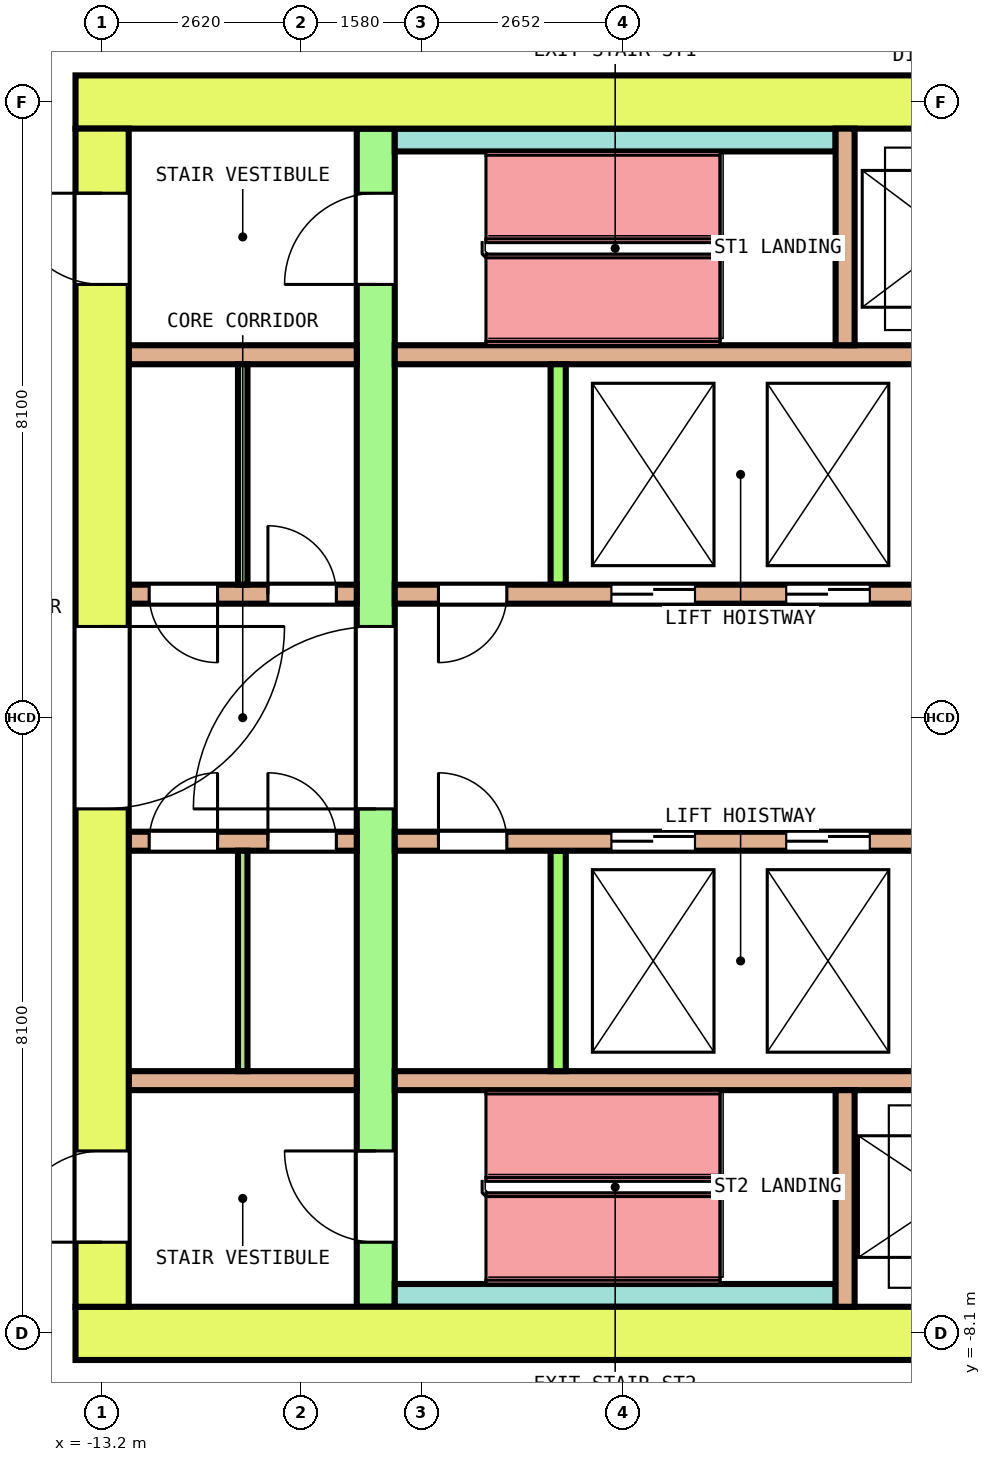
"""IFC4 building model, lengths in metres.
Left out: names, types, materials, properties, quantities, classifications, styles, units other than length and angle.
Written with IfcOpenShell. Run it as: python <this file> out.ifc"""

import sys

from ifc_helpers import new_model, si_unit, direction, frame, frame_2d, origin, place, context, subcontext, project, spatial, rectangle, extrude, element, fill, save


model = new_model("IFC4")
c1 = context("Model", 3, precision=1e-05, world=origin(), true_north=direction((0.0, 1.0)))
c2 = subcontext(c1, "Body", "Model", "MODEL_VIEW")
j1 = project(units=[si_unit("LENGTHUNIT", "METRE"), si_unit("PLANEANGLEUNIT", "RADIAN")], contexts=[c1])
p1 = place(None, origin())
s1 = spatial("IfcSite", under=j1, at=p1, CompositionType="ELEMENT")
p2 = place(p1, origin())
s2 = spatial("IfcBuilding", under=s1, at=p2, CompositionType="ELEMENT")
p3 = place(p2, frame((0.0, 0.0, 184.8)))
s3 = spatial("IfcBuildingStorey", under=s2, at=p3, CompositionType="ELEMENT", Elevation=184.8)
p4 = place(p3, frame((-13.55, 8.1, 0.0), z_axis=(0.0, 0.0, 1.0), x_axis=(1.0, 0.0, 0.0)))
e1 = element("IfcWall", 1, at=p4, inside=s3, PredefinedType="SHEAR", context=c2, shape_type="SweptSolid", body=[
    extrude(rectangle(XDim=27.1, YDim=0.7, at=frame_2d((13.55, 0.0))), origin(), (0.0, 0.0, 1.0), 4.1),
])
p5 = place(p4, frame((14.475, 0.0, 0.0)))
e2 = element("IfcOpeningElement", 2, at=p5, cuts=e1, PredefinedType="OPENING", context=c2, shape_type="SweptSolid", body=[
    extrude(rectangle(XDim=1.4, YDim=2.1, at=frame_2d((0.7, 1.05))), frame((0.0, 0.36, 0.0), z_axis=(0.0, -1.0, 0.0), x_axis=(1.0, 0.0, 0.0)), (0.0, 0.0, 1.0), 0.72),
])
p6 = place(p3, frame((-13.55, -8.1, 0.0), z_axis=(0.0, 0.0, 1.0), x_axis=(1.0, 0.0, 0.0)))
e3 = element("IfcWall", 3, at=p6, inside=s3, PredefinedType="SHEAR", context=c2, shape_type="SweptSolid", body=[
    extrude(rectangle(XDim=27.1, YDim=0.7, at=frame_2d((13.55, 0.0))), origin(), (0.0, 0.0, 1.0), 4.1),
])
p7 = place(p6, frame((15.1, 0.0, 0.0)))
e4 = element("IfcOpeningElement", 4, at=p7, cuts=e3, PredefinedType="OPENING", context=c2, shape_type="SweptSolid", body=[
    extrude(rectangle(XDim=1.2, YDim=2.1, at=frame_2d((0.6, 1.05))), frame((0.0, 0.36, 0.0), z_axis=(0.0, -1.0, 0.0), x_axis=(1.0, 0.0, 0.0)), (0.0, 0.0, 1.0), 0.72),
])
p8 = place(p3, frame((-13.2, -7.75, 0.0), z_axis=(0.0, 0.0, 1.0), x_axis=(0.0, 1.0, 0.0)))
e5 = element("IfcWall", 5, at=p8, inside=s3, PredefinedType="SHEAR", context=c2, shape_type="SweptSolid", body=[
    extrude(rectangle(XDim=15.5, YDim=0.7, at=frame_2d((7.75, 0.0))), origin(), (0.0, 0.0, 1.0), 4.1),
])
p9 = place(p8, frame((6.55, 0.0, 0.0)))
e6 = element("IfcOpeningElement", 6, at=p9, cuts=e5, PredefinedType="OPENING", context=c2, shape_type="SweptSolid", body=[
    extrude(rectangle(XDim=2.4, YDim=2.1, at=frame_2d((1.2, 1.05))), frame((0.0, 0.36, 0.0), z_axis=(0.0, -1.0, 0.0), x_axis=(1.0, 0.0, 0.0)), (0.0, 0.0, 1.0), 0.72),
])
p10 = place(p8, frame((13.45, 0.0, 0.0)))
e7 = element("IfcOpeningElement", 7, at=p10, cuts=e5, PredefinedType="OPENING", context=c2, shape_type="SweptSolid", body=[
    extrude(rectangle(XDim=1.2, YDim=2.1, at=frame_2d((0.6, 1.05))), frame((0.0, 0.36, 0.0), z_axis=(0.0, -1.0, 0.0), x_axis=(1.0, 0.0, 0.0)), (0.0, 0.0, 1.0), 0.72),
])
p11 = place(p8, frame((0.85, 0.0, 0.0)))
e8 = element("IfcOpeningElement", 8, at=p11, cuts=e5, PredefinedType="OPENING", context=c2, shape_type="SweptSolid", body=[
    extrude(rectangle(XDim=1.2, YDim=2.1, at=frame_2d((0.6, 1.05))), frame((0.0, 0.36, 0.0), z_axis=(0.0, -1.0, 0.0), x_axis=(1.0, 0.0, 0.0)), (0.0, 0.0, 1.0), 0.72),
])
p12 = place(p3, frame((-9.6, -7.75, 0.0), z_axis=(0.0, 0.0, 1.0), x_axis=(0.0, 1.0, 0.0)))
e9 = element("IfcWall", 9, at=p12, inside=s3, PredefinedType="SHEAR", context=c2, shape_type="SweptSolid", body=[
    extrude(rectangle(XDim=15.5, YDim=0.5, at=frame_2d((7.75, 0.0))), origin(), (0.0, 0.0, 1.0), 4.1),
])
p13 = place(p12, frame((6.55, 0.0, 0.0)))
e10 = element("IfcOpeningElement", 10, at=p13, cuts=e9, PredefinedType="OPENING", context=c2, shape_type="SweptSolid", body=[
    extrude(rectangle(XDim=2.4, YDim=2.1, at=frame_2d((1.2, 1.05))), frame((0.0, 0.26, 0.0), z_axis=(0.0, -1.0, 0.0), x_axis=(1.0, 0.0, 0.0)), (0.0, 0.0, 1.0), 0.52),
])
p14 = place(p12, frame((13.45, 0.0, 0.0)))
e11 = element("IfcOpeningElement", 11, at=p14, cuts=e9, PredefinedType="OPENING", context=c2, shape_type="SweptSolid", body=[
    extrude(rectangle(XDim=1.2, YDim=2.1, at=frame_2d((0.6, 1.05))), frame((0.0, 0.26, 0.0), z_axis=(0.0, -1.0, 0.0), x_axis=(1.0, 0.0, 0.0)), (0.0, 0.0, 1.0), 0.52),
])
p15 = place(p12, frame((0.85, 0.0, 0.0)))
e12 = element("IfcOpeningElement", 12, at=p15, cuts=e9, PredefinedType="OPENING", context=c2, shape_type="SweptSolid", body=[
    extrude(rectangle(XDim=1.2, YDim=2.1, at=frame_2d((0.6, 1.05))), frame((0.0, 0.26, 0.0), z_axis=(0.0, -1.0, 0.0), x_axis=(1.0, 0.0, 0.0)), (0.0, 0.0, 1.0), 0.52),
])
p16 = place(p3, frame((-12.85, 1.625, 0.0), z_axis=(0.0, 0.0, 1.0), x_axis=(1.0, 0.0, 0.0)))
e13 = element("IfcWall", 13, at=p16, inside=s3, PredefinedType="SOLIDWALL", context=c2, shape_type="SweptSolid", body=[
    extrude(rectangle(XDim=3.0, YDim=0.25, at=frame_2d((1.5, 0.0))), origin(), (0.0, 0.0, 1.0), 4.1),
])
p17 = place(p16, frame((0.269, 0.0, 0.0)))
e14 = element("IfcOpeningElement", 14, at=p17, cuts=e13, PredefinedType="OPENING", context=c2, shape_type="SweptSolid", body=[
    extrude(rectangle(XDim=0.9, YDim=2.1, at=frame_2d((0.45, 1.05))), frame((0.0, 0.135, 0.0), z_axis=(0.0, -1.0, 0.0), x_axis=(1.0, 0.0, 0.0)), (0.0, 0.0, 1.0), 0.27),
])
p18 = place(p16, frame((1.831, 0.0, 0.0)))
e15 = element("IfcOpeningElement", 15, at=p18, cuts=e13, PredefinedType="OPENING", context=c2, shape_type="SweptSolid", body=[
    extrude(rectangle(XDim=0.9, YDim=2.1, at=frame_2d((0.45, 1.05))), frame((0.0, 0.135, 0.0), z_axis=(0.0, -1.0, 0.0), x_axis=(1.0, 0.0, 0.0)), (0.0, 0.0, 1.0), 0.27),
])
p19 = place(p3, frame((-9.35, 1.625, 0.0), z_axis=(0.0, 0.0, 1.0), x_axis=(1.0, 0.0, 0.0)))
e16 = element("IfcWall", 16, at=p19, inside=s3, PredefinedType="SOLIDWALL", context=c2, shape_type="SweptSolid", body=[
    extrude(rectangle(XDim=18.7, YDim=0.25, at=frame_2d((9.35, 0.0))), origin(), (0.0, 0.0, 1.0), 4.1),
])
p20 = place(p19, frame((2.85, 0.0, 0.0)))
e17 = element("IfcOpeningElement", 17, at=p20, cuts=e16, PredefinedType="OPENING", context=c2, shape_type="SweptSolid", body=[
    extrude(rectangle(XDim=1.1, YDim=2.1, at=frame_2d((0.55, 1.05))), frame((0.0, 0.135, 0.0), z_axis=(0.0, -1.0, 0.0), x_axis=(1.0, 0.0, 0.0)), (0.0, 0.0, 1.0), 0.27),
])
p21 = place(p19, frame((5.15, 0.0, 0.0)))
e18 = element("IfcOpeningElement", 18, at=p21, cuts=e16, PredefinedType="OPENING", context=c2, shape_type="SweptSolid", body=[
    extrude(rectangle(XDim=1.1, YDim=2.1, at=frame_2d((0.55, 1.05))), frame((0.0, 0.135, 0.0), z_axis=(0.0, -1.0, 0.0), x_axis=(1.0, 0.0, 0.0)), (0.0, 0.0, 1.0), 0.27),
])
p22 = place(p19, frame((14.8, 0.0, 0.0)))
e19 = element("IfcOpeningElement", 19, at=p22, cuts=e16, PredefinedType="OPENING", context=c2, shape_type="SweptSolid", body=[
    extrude(rectangle(XDim=1.1, YDim=2.1, at=frame_2d((0.55, 1.05))), frame((0.0, 0.135, 0.0), z_axis=(0.0, -1.0, 0.0), x_axis=(1.0, 0.0, 0.0)), (0.0, 0.0, 1.0), 0.27),
])
p23 = place(p19, frame((0.575, 0.0, 0.0)))
e20 = element("IfcOpeningElement", 20, at=p23, cuts=e16, PredefinedType="OPENING", context=c2, shape_type="SweptSolid", body=[
    extrude(rectangle(XDim=0.9, YDim=2.1, at=frame_2d((0.45, 1.05))), frame((0.0, 0.135, 0.0), z_axis=(0.0, -1.0, 0.0), x_axis=(1.0, 0.0, 0.0)), (0.0, 0.0, 1.0), 0.27),
])
p24 = place(p19, frame((17.225, 0.0, 0.0)))
e21 = element("IfcOpeningElement", 21, at=p24, cuts=e16, PredefinedType="OPENING", context=c2, shape_type="SweptSolid", body=[
    extrude(rectangle(XDim=0.9, YDim=2.1, at=frame_2d((0.45, 1.05))), frame((0.0, 0.135, 0.0), z_axis=(0.0, -1.0, 0.0), x_axis=(1.0, 0.0, 0.0)), (0.0, 0.0, 1.0), 0.27),
])
p25 = place(p3, frame((-12.85, 4.775, 0.0), z_axis=(0.0, 0.0, 1.0), x_axis=(1.0, 0.0, 0.0)))
e22 = element("IfcWall", 22, at=p25, inside=s3, PredefinedType="SOLIDWALL", context=c2, shape_type="SweptSolid", body=[
    extrude(rectangle(XDim=3.0, YDim=0.25, at=frame_2d((1.5, 0.0))), origin(), (0.0, 0.0, 1.0), 4.1),
])
p26 = place(p3, frame((-9.35, 4.775, 0.0), z_axis=(0.0, 0.0, 1.0), x_axis=(1.0, 0.0, 0.0)))
e23 = element("IfcWall", 23, at=p26, inside=s3, PredefinedType="SOLIDWALL", context=c2, shape_type="SweptSolid", body=[
    extrude(rectangle(XDim=18.7, YDim=0.25, at=frame_2d((9.35, 0.0))), origin(), (0.0, 0.0, 1.0), 4.1),
])
p27 = place(p3, frame((-7.2, 1.75, 0.0), z_axis=(0.0, 0.0, 1.0), x_axis=(0.0, 1.0, 0.0)))
e24 = element("IfcWall", 24, at=p27, inside=s3, PredefinedType="SOLIDWALL", context=c2, shape_type="SweptSolid", body=[
    extrude(rectangle(XDim=2.9, YDim=0.2, at=frame_2d((1.45, 0.0))), origin(), (0.0, 0.0, 1.0), 4.1),
])
p28 = place(p3, frame((-12.85, -1.625, 0.0), z_axis=(0.0, 0.0, 1.0), x_axis=(1.0, 0.0, 0.0)))
e25 = element("IfcWall", 25, at=p28, inside=s3, PredefinedType="SOLIDWALL", context=c2, shape_type="SweptSolid", body=[
    extrude(rectangle(XDim=3.0, YDim=0.25, at=frame_2d((1.5, 0.0))), origin(), (0.0, 0.0, 1.0), 4.1),
])
p29 = place(p28, frame((0.269, 0.0, 0.0)))
e26 = element("IfcOpeningElement", 26, at=p29, cuts=e25, PredefinedType="OPENING", context=c2, shape_type="SweptSolid", body=[
    extrude(rectangle(XDim=0.9, YDim=2.1, at=frame_2d((0.45, 1.05))), frame((0.0, 0.135, 0.0), z_axis=(0.0, -1.0, 0.0), x_axis=(1.0, 0.0, 0.0)), (0.0, 0.0, 1.0), 0.27),
])
p30 = place(p28, frame((1.831, 0.0, 0.0)))
e27 = element("IfcOpeningElement", 27, at=p30, cuts=e25, PredefinedType="OPENING", context=c2, shape_type="SweptSolid", body=[
    extrude(rectangle(XDim=0.9, YDim=2.1, at=frame_2d((0.45, 1.05))), frame((0.0, 0.135, 0.0), z_axis=(0.0, -1.0, 0.0), x_axis=(1.0, 0.0, 0.0)), (0.0, 0.0, 1.0), 0.27),
])
p31 = place(p3, frame((-9.35, -1.625, 0.0), z_axis=(0.0, 0.0, 1.0), x_axis=(1.0, 0.0, 0.0)))
e28 = element("IfcWall", 28, at=p31, inside=s3, PredefinedType="SOLIDWALL", context=c2, shape_type="SweptSolid", body=[
    extrude(rectangle(XDim=18.7, YDim=0.25, at=frame_2d((9.35, 0.0))), origin(), (0.0, 0.0, 1.0), 4.1),
])
p32 = place(p31, frame((2.85, 0.0, 0.0)))
e29 = element("IfcOpeningElement", 29, at=p32, cuts=e28, PredefinedType="OPENING", context=c2, shape_type="SweptSolid", body=[
    extrude(rectangle(XDim=1.1, YDim=2.1, at=frame_2d((0.55, 1.05))), frame((0.0, 0.135, 0.0), z_axis=(0.0, -1.0, 0.0), x_axis=(1.0, 0.0, 0.0)), (0.0, 0.0, 1.0), 0.27),
])
p33 = place(p31, frame((5.15, 0.0, 0.0)))
e30 = element("IfcOpeningElement", 30, at=p33, cuts=e28, PredefinedType="OPENING", context=c2, shape_type="SweptSolid", body=[
    extrude(rectangle(XDim=1.1, YDim=2.1, at=frame_2d((0.55, 1.05))), frame((0.0, 0.135, 0.0), z_axis=(0.0, -1.0, 0.0), x_axis=(1.0, 0.0, 0.0)), (0.0, 0.0, 1.0), 0.27),
])
p34 = place(p31, frame((14.8, 0.0, 0.0)))
e31 = element("IfcOpeningElement", 31, at=p34, cuts=e28, PredefinedType="OPENING", context=c2, shape_type="SweptSolid", body=[
    extrude(rectangle(XDim=1.1, YDim=2.1, at=frame_2d((0.55, 1.05))), frame((0.0, 0.135, 0.0), z_axis=(0.0, -1.0, 0.0), x_axis=(1.0, 0.0, 0.0)), (0.0, 0.0, 1.0), 0.27),
])
p35 = place(p31, frame((0.575, 0.0, 0.0)))
e32 = element("IfcOpeningElement", 32, at=p35, cuts=e28, PredefinedType="OPENING", context=c2, shape_type="SweptSolid", body=[
    extrude(rectangle(XDim=0.9, YDim=2.1, at=frame_2d((0.45, 1.05))), frame((0.0, 0.135, 0.0), z_axis=(0.0, -1.0, 0.0), x_axis=(1.0, 0.0, 0.0)), (0.0, 0.0, 1.0), 0.27),
])
p36 = place(p31, frame((17.225, 0.0, 0.0)))
e33 = element("IfcOpeningElement", 33, at=p36, cuts=e28, PredefinedType="OPENING", context=c2, shape_type="SweptSolid", body=[
    extrude(rectangle(XDim=0.9, YDim=2.1, at=frame_2d((0.45, 1.05))), frame((0.0, 0.135, 0.0), z_axis=(0.0, -1.0, 0.0), x_axis=(1.0, 0.0, 0.0)), (0.0, 0.0, 1.0), 0.27),
])
p37 = place(p3, frame((-12.85, -4.775, 0.0), z_axis=(0.0, 0.0, 1.0), x_axis=(1.0, 0.0, 0.0)))
e34 = element("IfcWall", 34, at=p37, inside=s3, PredefinedType="SOLIDWALL", context=c2, shape_type="SweptSolid", body=[
    extrude(rectangle(XDim=3.0, YDim=0.25, at=frame_2d((1.5, 0.0))), origin(), (0.0, 0.0, 1.0), 4.1),
])
p38 = place(p3, frame((-9.35, -4.775, 0.0), z_axis=(0.0, 0.0, 1.0), x_axis=(1.0, 0.0, 0.0)))
e35 = element("IfcWall", 35, at=p38, inside=s3, PredefinedType="SOLIDWALL", context=c2, shape_type="SweptSolid", body=[
    extrude(rectangle(XDim=18.7, YDim=0.25, at=frame_2d((9.35, 0.0))), origin(), (0.0, 0.0, 1.0), 4.1),
])
p39 = place(p3, frame((-7.2, -4.65, 0.0), z_axis=(0.0, 0.0, 1.0), x_axis=(0.0, 1.0, 0.0)))
e36 = element("IfcWall", 36, at=p39, inside=s3, PredefinedType="SOLIDWALL", context=c2, shape_type="SweptSolid", body=[
    extrude(rectangle(XDim=2.9, YDim=0.2, at=frame_2d((1.45, 0.0))), origin(), (0.0, 0.0, 1.0), 4.1),
])
p40 = place(p3, frame((-9.35, 7.6, 0.0), z_axis=(0.0, 0.0, 1.0), x_axis=(1.0, 0.0, 0.0)))
e37 = element("IfcWall", 37, at=p40, inside=s3, PredefinedType="SOLIDWALL", context=c2, shape_type="SweptSolid", body=[
    extrude(rectangle(XDim=5.8, YDim=0.3, at=frame_2d((2.9, 0.0))), origin(), (0.0, 0.0, 1.0), 4.1),
])
p41 = place(p3, frame((-3.425, 4.9, 0.0), z_axis=(0.0, 0.0, 1.0), x_axis=(0.0, 1.0, 0.0)))
e38 = element("IfcWall", 38, at=p41, inside=s3, PredefinedType="SOLIDWALL", context=c2, shape_type="SweptSolid", body=[
    extrude(rectangle(XDim=2.85, YDim=0.25, at=frame_2d((1.425, 0.0))), origin(), (0.0, 0.0, 1.0), 4.1),
])
p42 = place(p3, frame((-9.35, -7.6, 0.0), z_axis=(0.0, 0.0, 1.0), x_axis=(1.0, 0.0, 0.0)))
e39 = element("IfcWall", 39, at=p42, inside=s3, PredefinedType="SOLIDWALL", context=c2, shape_type="SweptSolid", body=[
    extrude(rectangle(XDim=5.8, YDim=0.3, at=frame_2d((2.9, 0.0))), origin(), (0.0, 0.0, 1.0), 4.1),
])
p43 = place(p3, frame((-3.425, -7.75, 0.0), z_axis=(0.0, 0.0, 1.0), x_axis=(0.0, 1.0, 0.0)))
e40 = element("IfcWall", 40, at=p43, inside=s3, PredefinedType="SOLIDWALL", context=c2, shape_type="SweptSolid", body=[
    extrude(rectangle(XDim=2.85, YDim=0.25, at=frame_2d((1.425, 0.0))), origin(), (0.0, 0.0, 1.0), 4.1),
])
for number, where, z_axis, x_axis in (
    (41, (-11.35, 1.75, 0.0), (0.0, 0.0, 1.0), (0.0, 1.0, 0.0)),
    (42, (-11.35, -4.65, 0.0), (0.0, 0.0, 1.0), (0.0, 1.0, 0.0)),
):
    element("IfcWall", number, at=place(p3, frame(where, z_axis=z_axis, x_axis=x_axis)), inside=s3, PredefinedType="PARTITIONING", context=c2, shape_type="SweptSolid", body=[
        extrude(rectangle(XDim=2.9, YDim=0.125, at=frame_2d((1.45, 0.0))), origin(), (0.0, 0.0, 1.0), 4.1),
    ])
p44 = place(p20, origin())
e43 = element("IfcDoor", 43, at=p44, inside=s3, OperationType="DOUBLE_DOOR_SLIDING", PredefinedType="DOOR", context=c2, shape_type="SweptSolid", body=[
    extrude(rectangle(XDim=1.1, YDim=2.1, at=frame_2d((0.55, 1.05))), frame((0.0, 0.075, 0.0), z_axis=(0.0, -1.0, 0.0), x_axis=(1.0, 0.0, 0.0)), (0.0, 0.0, 1.0), 0.15),
])
fill(e17, e43)
p45 = place(p21, origin())
e44 = element("IfcDoor", 44, at=p45, inside=s3, OperationType="DOUBLE_DOOR_SLIDING", PredefinedType="DOOR", context=c2, shape_type="SweptSolid", body=[
    extrude(rectangle(XDim=1.1, YDim=2.1, at=frame_2d((0.55, 1.05))), frame((0.0, 0.075, 0.0), z_axis=(0.0, -1.0, 0.0), x_axis=(1.0, 0.0, 0.0)), (0.0, 0.0, 1.0), 0.15),
])
fill(e18, e44)
p46 = place(p32, origin())
e45 = element("IfcDoor", 45, at=p46, inside=s3, OperationType="DOUBLE_DOOR_SLIDING", PredefinedType="DOOR", context=c2, shape_type="SweptSolid", body=[
    extrude(rectangle(XDim=1.1, YDim=2.1, at=frame_2d((0.55, 1.05))), frame((0.0, 0.075, 0.0), z_axis=(0.0, -1.0, 0.0), x_axis=(1.0, 0.0, 0.0)), (0.0, 0.0, 1.0), 0.15),
])
fill(e29, e45)
p47 = place(p33, origin())
e46 = element("IfcDoor", 46, at=p47, inside=s3, OperationType="DOUBLE_DOOR_SLIDING", PredefinedType="DOOR", context=c2, shape_type="SweptSolid", body=[
    extrude(rectangle(XDim=1.1, YDim=2.1, at=frame_2d((0.55, 1.05))), frame((0.0, 0.075, 0.0), z_axis=(0.0, -1.0, 0.0), x_axis=(1.0, 0.0, 0.0)), (0.0, 0.0, 1.0), 0.15),
])
fill(e30, e46)
p48 = place(p13, origin())
e47 = element("IfcDoor", 47, at=p48, inside=s3, OperationType="DOUBLE_DOOR_SINGLE_SWING", PredefinedType="DOOR", context=c2, shape_type="SweptSolid", body=[
    extrude(rectangle(XDim=2.4, YDim=2.1, at=frame_2d((1.2, 1.05))), frame((0.0, 0.2, 0.0), z_axis=(0.0, -1.0, 0.0), x_axis=(1.0, 0.0, 0.0)), (0.0, 0.0, 1.0), 0.4),
])
fill(e10, e47)
p49 = place(p9, origin())
e48 = element("IfcDoor", 48, at=p49, inside=s3, OperationType="DOUBLE_DOOR_SINGLE_SWING", PredefinedType="DOOR", context=c2, shape_type="SweptSolid", body=[
    extrude(rectangle(XDim=2.4, YDim=2.1, at=frame_2d((1.2, 1.05))), frame((0.0, 0.3, 0.0), z_axis=(0.0, -1.0, 0.0), x_axis=(1.0, 0.0, 0.0)), (0.0, 0.0, 1.0), 0.6),
])
fill(e6, e48)
p50 = place(p14, origin())
e49 = element("IfcDoor", 49, at=p50, inside=s3, OperationType="SINGLE_SWING_LEFT", PredefinedType="DOOR", context=c2, shape_type="SweptSolid", body=[
    extrude(rectangle(XDim=1.2, YDim=2.1, at=frame_2d((0.6, 1.05))), frame((0.0, 0.2, 0.0), z_axis=(0.0, -1.0, 0.0), x_axis=(1.0, 0.0, 0.0)), (0.0, 0.0, 1.0), 0.4),
])
fill(e11, e49)
p51 = place(p10, origin())
e50 = element("IfcDoor", 50, at=p51, inside=s3, OperationType="SINGLE_SWING_RIGHT", PredefinedType="DOOR", context=c2, shape_type="SweptSolid", body=[
    extrude(rectangle(XDim=1.2, YDim=2.1, at=frame_2d((0.6, 1.05))), frame((0.0, 0.3, 0.0), z_axis=(0.0, -1.0, 0.0), x_axis=(1.0, 0.0, 0.0)), (0.0, 0.0, 1.0), 0.6),
])
fill(e7, e50)
p52 = place(p15, origin())
e51 = element("IfcDoor", 51, at=p52, inside=s3, OperationType="SINGLE_SWING_LEFT", PredefinedType="DOOR", context=c2, shape_type="SweptSolid", body=[
    extrude(rectangle(XDim=1.2, YDim=2.1, at=frame_2d((0.6, 1.05))), frame((0.0, 0.2, 0.0), z_axis=(0.0, -1.0, 0.0), x_axis=(1.0, 0.0, 0.0)), (0.0, 0.0, 1.0), 0.4),
])
fill(e12, e51)
p53 = place(p11, origin())
e52 = element("IfcDoor", 52, at=p53, inside=s3, OperationType="SINGLE_SWING_RIGHT", PredefinedType="DOOR", context=c2, shape_type="SweptSolid", body=[
    extrude(rectangle(XDim=1.2, YDim=2.1, at=frame_2d((0.6, 1.05))), frame((0.0, 0.3, 0.0), z_axis=(0.0, -1.0, 0.0), x_axis=(1.0, 0.0, 0.0)), (0.0, 0.0, 1.0), 0.6),
])
fill(e8, e52)
p54 = place(p17, origin())
e53 = element("IfcDoor", 53, at=p54, inside=s3, OperationType="SINGLE_SWING_RIGHT", PredefinedType="DOOR", context=c2, shape_type="SweptSolid", body=[
    extrude(rectangle(XDim=0.9, YDim=2.1, at=frame_2d((0.45, 1.05))), frame((0.0, 0.075, 0.0), z_axis=(0.0, -1.0, 0.0), x_axis=(1.0, 0.0, 0.0)), (0.0, 0.0, 1.0), 0.15),
])
fill(e14, e53)
p55 = place(p18, origin())
e54 = element("IfcDoor", 54, at=p55, inside=s3, OperationType="SINGLE_SWING_LEFT", PredefinedType="DOOR", context=c2, shape_type="SweptSolid", body=[
    extrude(rectangle(XDim=0.9, YDim=2.1, at=frame_2d((0.45, 1.05))), frame((0.0, 0.075, 0.0), z_axis=(0.0, -1.0, 0.0), x_axis=(1.0, 0.0, 0.0)), (0.0, 0.0, 1.0), 0.15),
])
fill(e15, e54)
p56 = place(p23, origin())
e55 = element("IfcDoor", 55, at=p56, inside=s3, OperationType="SINGLE_SWING_RIGHT", PredefinedType="DOOR", context=c2, shape_type="SweptSolid", body=[
    extrude(rectangle(XDim=0.9, YDim=2.1, at=frame_2d((0.45, 1.05))), frame((0.0, 0.075, 0.0), z_axis=(0.0, -1.0, 0.0), x_axis=(1.0, 0.0, 0.0)), (0.0, 0.0, 1.0), 0.15),
])
fill(e20, e55)
p57 = place(p29, origin())
e56 = element("IfcDoor", 56, at=p57, inside=s3, OperationType="SINGLE_SWING_LEFT", PredefinedType="DOOR", context=c2, shape_type="SweptSolid", body=[
    extrude(rectangle(XDim=0.9, YDim=2.1, at=frame_2d((0.45, 1.05))), frame((0.0, 0.075, 0.0), z_axis=(0.0, -1.0, 0.0), x_axis=(1.0, 0.0, 0.0)), (0.0, 0.0, 1.0), 0.15),
])
fill(e26, e56)
p58 = place(p30, origin())
e57 = element("IfcDoor", 57, at=p58, inside=s3, OperationType="SINGLE_SWING_RIGHT", PredefinedType="DOOR", context=c2, shape_type="SweptSolid", body=[
    extrude(rectangle(XDim=0.9, YDim=2.1, at=frame_2d((0.45, 1.05))), frame((0.0, 0.075, 0.0), z_axis=(0.0, -1.0, 0.0), x_axis=(1.0, 0.0, 0.0)), (0.0, 0.0, 1.0), 0.15),
])
fill(e27, e57)
p59 = place(p35, origin())
e58 = element("IfcDoor", 58, at=p59, inside=s3, OperationType="SINGLE_SWING_LEFT", PredefinedType="DOOR", context=c2, shape_type="SweptSolid", body=[
    extrude(rectangle(XDim=0.9, YDim=2.1, at=frame_2d((0.45, 1.05))), frame((0.0, 0.075, 0.0), z_axis=(0.0, -1.0, 0.0), x_axis=(1.0, 0.0, 0.0)), (0.0, 0.0, 1.0), 0.15),
])
fill(e32, e58)
save(model, sys.argv[1])
